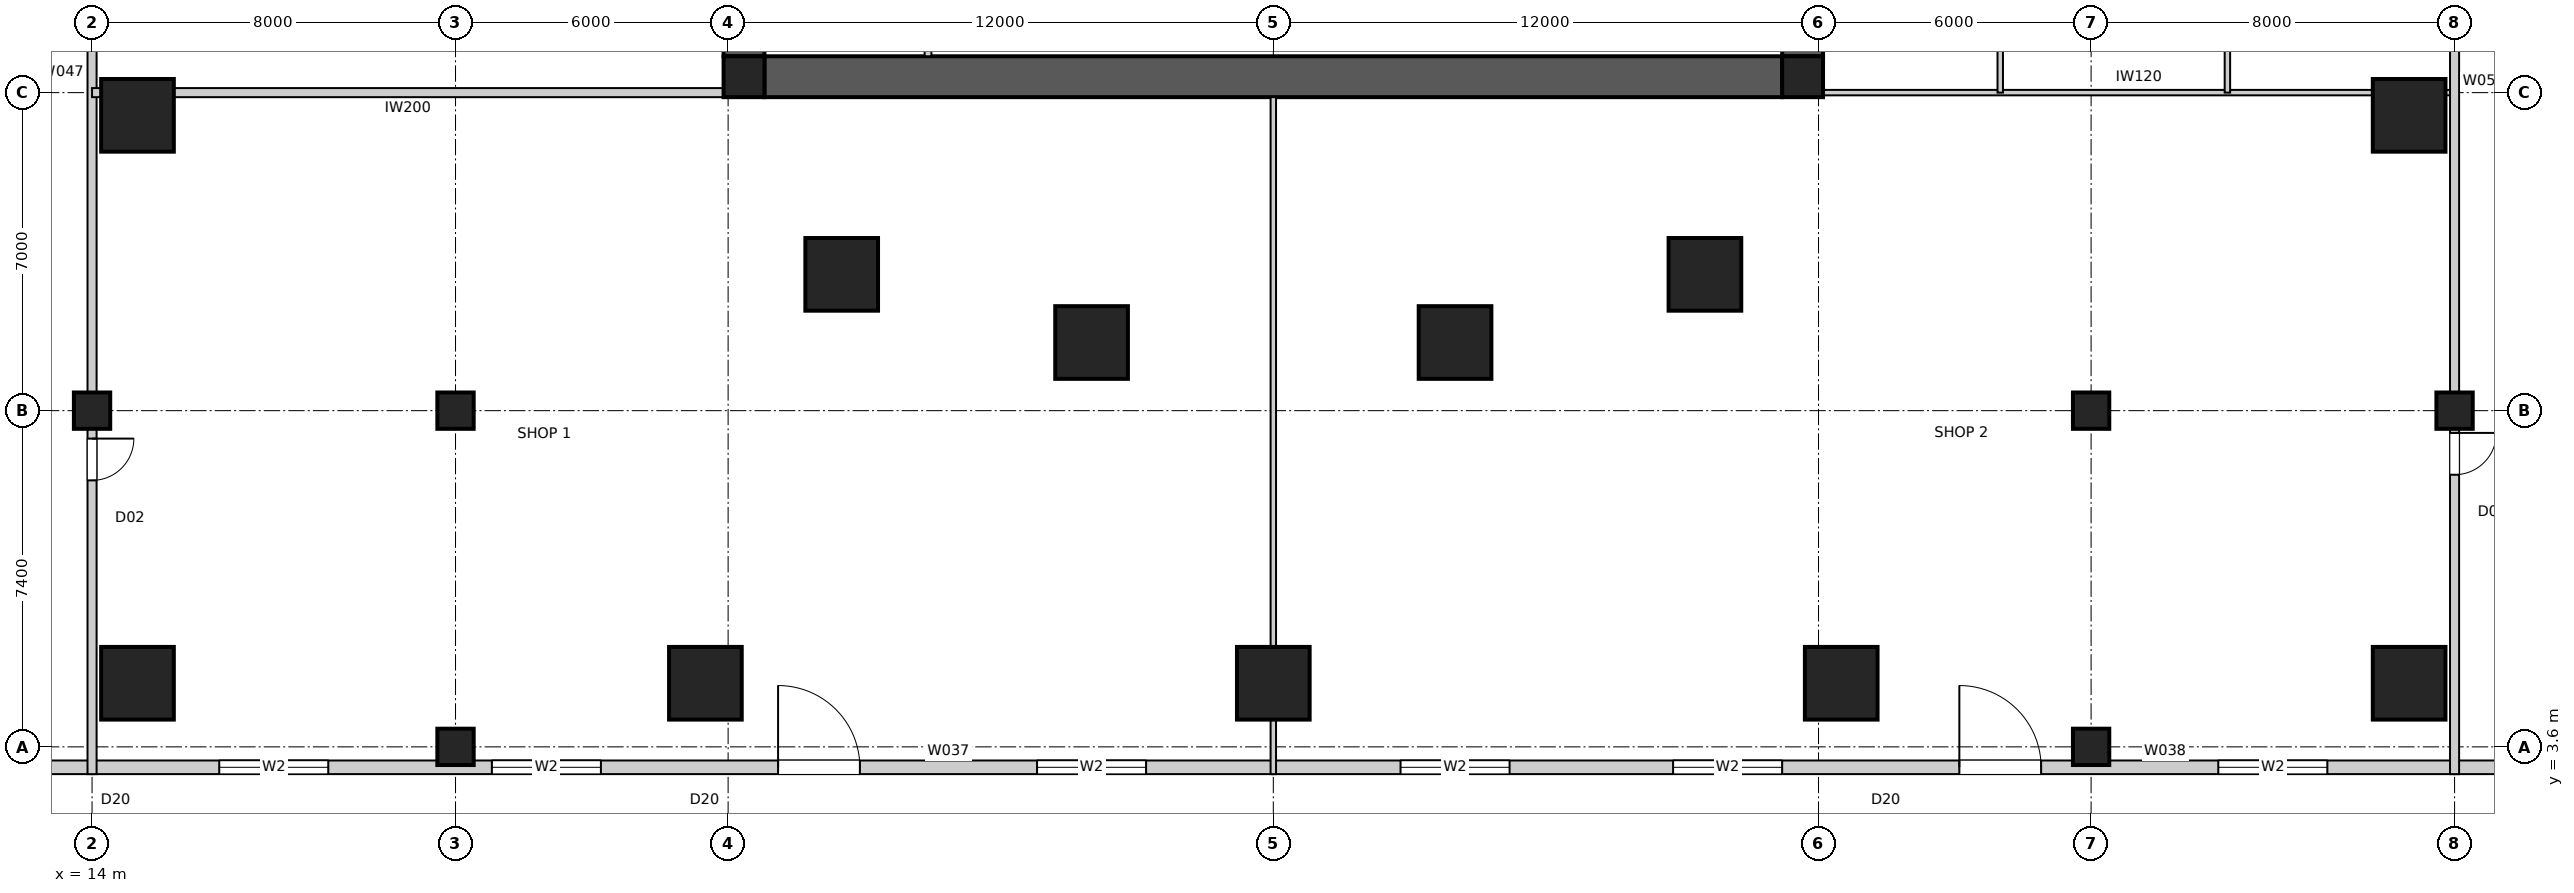
"""IFC4 building model, lengths in metres.
Left out: names, types, materials, properties, quantities, classifications, styles, units other than length and angle.
Written with IfcOpenShell. Run it as: python <this file> out.ifc"""

import sys

from ifc_helpers import new_model, si_unit, direction, frame, frame_2d, origin, origin_2d, place, context, subcontext, project, spatial, polyline, rectangle, outline, extrude, element, fill, save


model = new_model("IFC4")
c1 = context("Model", 3, precision=1e-05, world=origin(), true_north=direction((0.0, 1.0)))
c2 = subcontext(c1, "Body", "Model", "MODEL_VIEW")
j1 = project(units=[si_unit("LENGTHUNIT", "METRE"), si_unit("PLANEANGLEUNIT", "RADIAN")], contexts=[c1])
p1 = place(None, origin())
s1 = spatial("IfcSite", under=j1, at=p1, CompositionType="ELEMENT")
p2 = place(p1, origin())
s2 = spatial("IfcBuilding", under=s1, at=p2, CompositionType="ELEMENT")
p3 = place(p2, origin())
s3 = spatial("IfcBuildingStorey", under=s2, at=p3, CompositionType="ELEMENT", Elevation=0.0)
p4 = place(p3, frame((51.2, 18.35, 0.0), z_axis=(0.0, 0.0, 1.0), x_axis=(-1.0, 0.0, 0.0)))
e1 = element("IfcWall", 1, at=p4, inside=s3, PredefinedType="SHEAR", context=c2, shape_type="SweptSolid", body=[
    extrude(outline(polyline([(0.0, -0.45), (22.4, -0.45), (22.4, -0.025), (22.85, -0.025), (22.85, 0.025), (22.4, 0.025), (22.4, 0.45), (0.0, 0.45), (0.0, 0.025), (-0.45, 0.025), (-0.45, -0.025), (0.0, -0.025), (0.0, -0.45)])), origin(), (0.0, 0.0, 1.0), 6.0),
])
p5 = place(p3, frame((51.65, 18.8, 0.0), z_axis=(0.0, 0.0, 1.0), x_axis=(0.0, 1.0, 0.0)))
e2 = element("IfcWall", 2, at=p5, inside=s3, PredefinedType="SHEAR", context=c2, shape_type="SweptSolid", body=[
    extrude(outline(polyline([(0.0, -0.45), (22.4, -0.45), (22.4, -0.025), (22.85, -0.025), (22.85, 0.025), (22.4, 0.025), (22.4, 0.45), (0.0, 0.45), (0.0, 0.025), (-0.45, 0.025), (-0.45, -0.025), (0.0, -0.025), (0.0, -0.45)])), origin(), (0.0, 0.0, 1.0), 6.0),
])
p6 = place(p5, frame((11.14, 0.0, 0.0)))
e3 = element("IfcOpeningElement", 3, at=p6, cuts=e2, PredefinedType="OPENING", context=c2, shape_type="SweptSolid", body=[
    extrude(rectangle(XDim=1.02, YDim=2.4, at=frame_2d((0.51, 1.2))), frame((0.0, 0.46, 0.0), z_axis=(0.0, -1.0, 0.0), x_axis=(1.0, 0.0, 0.0)), (0.0, 0.0, 1.0), 0.92),
])
p7 = place(p3, frame((28.35, 41.2, 0.0), z_axis=(0.0, 0.0, 1.0), x_axis=(0.0, -1.0, 0.0)))
e4 = element("IfcWall", 4, at=p7, inside=s3, PredefinedType="SHEAR", context=c2, shape_type="SweptSolid", body=[
    extrude(outline(polyline([(0.0, -0.45), (22.4, -0.45), (22.4, -0.025), (22.85, -0.025), (22.85, 0.025), (22.4, 0.025), (22.4, 0.45), (0.0, 0.45), (0.0, 0.025), (-0.45, 0.025), (-0.45, -0.025), (0.0, -0.025), (0.0, -0.45)])), origin(), (0.0, 0.0, 1.0), 6.0),
])
p8 = place(p7, frame((11.14, 0.0, 0.0)))
e5 = element("IfcOpeningElement", 5, at=p8, cuts=e4, PredefinedType="OPENING", context=c2, shape_type="SweptSolid", body=[
    extrude(rectangle(XDim=1.02, YDim=2.4, at=frame_2d((0.51, 1.2))), frame((0.0, 0.46, 0.0), z_axis=(0.0, -1.0, 0.0), x_axis=(1.0, 0.0, 0.0)), (0.0, 0.0, 1.0), 0.92),
])
for number, where, z_axis, x_axis in (
    (6, (28.35, 18.35, 0.0), (0.0, 0.0, 1.0), (1.0, 0.0, 0.0)),
    (7, (51.65, 18.35, 0.0), (0.0, 0.0, 1.0), (1.0, 0.0, 0.0)),
):
    element("IfcColumn", number, at=place(p3, frame(where, z_axis=z_axis, x_axis=x_axis)), inside=s3, PredefinedType="COLUMN", context=c2, shape_type="SweptSolid", body=[
        extrude(rectangle(XDim=0.9, YDim=0.9, at=origin_2d()), origin(), (0.0, 0.0, 1.0), 6.0),
    ])
for number, where, z_axis, x_axis in (
    (8, (15.0, 5.0, 0.0), (0.0, 0.0, 1.0), (1.0, 0.0, 0.0)),
    (9, (27.5, 5.0, 0.0), (0.0, 0.0, 1.0), (1.0, 0.0, 0.0)),
    (10, (40.0, 5.0, 0.0), (0.0, 0.0, 1.0), (1.0, 0.0, 0.0)),
    (11, (52.5, 5.0, 0.0), (0.0, 0.0, 1.0), (1.0, 0.0, 0.0)),
    (12, (65.0, 5.0, 0.0), (0.0, 0.0, 1.0), (1.0, 0.0, 0.0)),
    (13, (65.0, 17.5, 0.0), (0.0, 0.0, 1.0), (1.0, 0.0, 0.0)),
    (14, (15.0, 17.5, 0.0), (0.0, 0.0, 1.0), (1.0, 0.0, 0.0)),
):
    element("IfcColumn", number, at=place(p3, frame(where, z_axis=z_axis, x_axis=x_axis)), inside=s3, PredefinedType="COLUMN", context=c2, shape_type="SweptSolid", body=[
        extrude(rectangle(XDim=1.6, YDim=1.6, at=origin_2d()), origin(), (0.0, 0.0, 1.0), 6.0),
    ])
for number, where, z_axis, x_axis in (
    (15, (14.0, 11.0, 0.0), (0.0, 0.0, 1.0), (1.0, 0.0, 0.0)),
    (16, (22.0, 3.6, 0.0), (0.0, 0.0, 1.0), (1.0, 0.0, 0.0)),
    (17, (22.0, 11.0, 0.0), (0.0, 0.0, 1.0), (1.0, 0.0, 0.0)),
    (18, (58.0, 3.6, 0.0), (0.0, 0.0, 1.0), (1.0, 0.0, 0.0)),
    (19, (58.0, 11.0, 0.0), (0.0, 0.0, 1.0), (1.0, 0.0, 0.0)),
    (20, (66.0, 11.0, 0.0), (0.0, 0.0, 1.0), (1.0, 0.0, 0.0)),
):
    element("IfcColumn", number, at=place(p3, frame(where, z_axis=z_axis, x_axis=x_axis)), inside=s3, PredefinedType="COLUMN", context=c2, shape_type="SweptSolid", body=[
        extrude(rectangle(XDim=0.8, YDim=0.8, at=origin_2d()), origin(), (0.0, 0.0, 1.0), 6.0),
    ])
for number, where, z_axis, x_axis in (
    (21, (30.5, 14.0, 0.0), (0.0, 0.0, 1.0), (1.0, 0.0, 0.0)),
    (22, (36.0, 12.5, 0.0), (0.0, 0.0, 1.0), (1.0, 0.0, 0.0)),
    (23, (44.0, 12.5, 0.0), (0.0, 0.0, 1.0), (1.0, 0.0, 0.0)),
    (24, (49.5, 14.0, 0.0), (0.0, 0.0, 1.0), (1.0, 0.0, 0.0)),
):
    element("IfcColumn", number, at=place(p3, frame(where, z_axis=z_axis, x_axis=x_axis)), inside=s3, PredefinedType="COLUMN", context=c2, shape_type="SweptSolid", body=[
        extrude(rectangle(XDim=1.6, YDim=1.6, at=origin_2d()), origin(), (0.0, 0.0, 1.0), 6.0),
    ])
p9 = place(p3, frame((2.0, 3.15, 0.0), z_axis=(0.0, 0.0, 1.0), x_axis=(1.0, 0.0, 0.0)))
e25 = element("IfcWall", 25, at=p9, inside=s3, PredefinedType="SOLIDWALL", context=c2, shape_type="SweptSolid", body=[
    extrude(rectangle(XDim=12.0, YDim=0.3, at=frame_2d((6.0, 0.0))), origin(), (0.0, 0.0, 1.0), 5.65),
])
p10 = place(p9, frame((1.1, 0.0, 0.0)))
e26 = element("IfcOpeningElement", 26, at=p10, cuts=e25, PredefinedType="OPENING", context=c2, shape_type="SweptSolid", body=[
    extrude(rectangle(XDim=1.8, YDim=2.7, at=frame_2d((0.9, 1.35))), frame((0.0, 0.16, 0.0), z_axis=(0.0, -1.0, 0.0), x_axis=(1.0, 0.0, 0.0)), (0.0, 0.0, 1.0), 0.32),
])
p11 = place(p9, frame((5.1, 0.0, 0.0)))
e27 = element("IfcOpeningElement", 27, at=p11, cuts=e25, PredefinedType="OPENING", context=c2, shape_type="SweptSolid", body=[
    extrude(rectangle(XDim=1.8, YDim=2.7, at=frame_2d((0.9, 1.35))), frame((0.0, 0.16, 0.0), z_axis=(0.0, -1.0, 0.0), x_axis=(1.0, 0.0, 0.0)), (0.0, 0.0, 1.0), 0.32),
])
p12 = place(p9, frame((9.1, 0.0, 0.0)))
e28 = element("IfcOpeningElement", 28, at=p12, cuts=e25, PredefinedType="OPENING", context=c2, shape_type="SweptSolid", body=[
    extrude(rectangle(XDim=1.8, YDim=2.7, at=frame_2d((0.9, 1.35))), frame((0.0, 0.16, 0.0), z_axis=(0.0, -1.0, 0.0), x_axis=(1.0, 0.0, 0.0)), (0.0, 0.0, 1.0), 0.32),
])
p13 = place(p3, frame((14.0, 3.15, 0.0), z_axis=(0.0, 0.0, 1.0), x_axis=(1.0, 0.0, 0.0)))
e29 = element("IfcWall", 29, at=p13, inside=s3, PredefinedType="SOLIDWALL", context=c2, shape_type="SweptSolid", body=[
    extrude(rectangle(XDim=26.0, YDim=0.3, at=frame_2d((13.0, 0.0))), origin(), (0.0, 0.0, 1.0), 5.65),
])
p14 = place(p13, frame((2.8, 0.0, 0.6)))
e30 = element("IfcOpeningElement", 30, at=p14, cuts=e29, PredefinedType="OPENING", context=c2, shape_type="SweptSolid", body=[
    extrude(rectangle(XDim=2.4, YDim=3.6, at=frame_2d((1.2, 1.8))), frame((0.0, 0.16, 0.0), z_axis=(0.0, -1.0, 0.0), x_axis=(1.0, 0.0, 0.0)), (0.0, 0.0, 1.0), 0.32),
])
p15 = place(p13, frame((8.8, 0.0, 0.6)))
e31 = element("IfcOpeningElement", 31, at=p15, cuts=e29, PredefinedType="OPENING", context=c2, shape_type="SweptSolid", body=[
    extrude(rectangle(XDim=2.4, YDim=3.6, at=frame_2d((1.2, 1.8))), frame((0.0, 0.16, 0.0), z_axis=(0.0, -1.0, 0.0), x_axis=(1.0, 0.0, 0.0)), (0.0, 0.0, 1.0), 0.32),
])
p16 = place(p13, frame((15.1, 0.0, 0.0)))
e32 = element("IfcOpeningElement", 32, at=p16, cuts=e29, PredefinedType="OPENING", context=c2, shape_type="SweptSolid", body=[
    extrude(rectangle(XDim=1.8, YDim=2.7, at=frame_2d((0.9, 1.35))), frame((0.0, 0.16, 0.0), z_axis=(0.0, -1.0, 0.0), x_axis=(1.0, 0.0, 0.0)), (0.0, 0.0, 1.0), 0.32),
])
p17 = place(p13, frame((20.8, 0.0, 0.6)))
e33 = element("IfcOpeningElement", 33, at=p17, cuts=e29, PredefinedType="OPENING", context=c2, shape_type="SweptSolid", body=[
    extrude(rectangle(XDim=2.4, YDim=3.6, at=frame_2d((1.2, 1.8))), frame((0.0, 0.16, 0.0), z_axis=(0.0, -1.0, 0.0), x_axis=(1.0, 0.0, 0.0)), (0.0, 0.0, 1.0), 0.32),
])
p18 = place(p3, frame((40.0, 3.15, 0.0), z_axis=(0.0, 0.0, 1.0), x_axis=(1.0, 0.0, 0.0)))
e34 = element("IfcWall", 34, at=p18, inside=s3, PredefinedType="SOLIDWALL", context=c2, shape_type="SweptSolid", body=[
    extrude(rectangle(XDim=26.0, YDim=0.3, at=frame_2d((13.0, 0.0))), origin(), (0.0, 0.0, 1.0), 5.65),
])
p19 = place(p18, frame((2.8, 0.0, 0.6)))
e35 = element("IfcOpeningElement", 35, at=p19, cuts=e34, PredefinedType="OPENING", context=c2, shape_type="SweptSolid", body=[
    extrude(rectangle(XDim=2.4, YDim=3.6, at=frame_2d((1.2, 1.8))), frame((0.0, 0.16, 0.0), z_axis=(0.0, -1.0, 0.0), x_axis=(1.0, 0.0, 0.0)), (0.0, 0.0, 1.0), 0.32),
])
p20 = place(p18, frame((8.8, 0.0, 0.6)))
e36 = element("IfcOpeningElement", 36, at=p20, cuts=e34, PredefinedType="OPENING", context=c2, shape_type="SweptSolid", body=[
    extrude(rectangle(XDim=2.4, YDim=3.6, at=frame_2d((1.2, 1.8))), frame((0.0, 0.16, 0.0), z_axis=(0.0, -1.0, 0.0), x_axis=(1.0, 0.0, 0.0)), (0.0, 0.0, 1.0), 0.32),
])
p21 = place(p18, frame((15.1, 0.0, 0.0)))
e37 = element("IfcOpeningElement", 37, at=p21, cuts=e34, PredefinedType="OPENING", context=c2, shape_type="SweptSolid", body=[
    extrude(rectangle(XDim=1.8, YDim=2.7, at=frame_2d((0.9, 1.35))), frame((0.0, 0.16, 0.0), z_axis=(0.0, -1.0, 0.0), x_axis=(1.0, 0.0, 0.0)), (0.0, 0.0, 1.0), 0.32),
])
p22 = place(p18, frame((20.8, 0.0, 0.6)))
e38 = element("IfcOpeningElement", 38, at=p22, cuts=e34, PredefinedType="OPENING", context=c2, shape_type="SweptSolid", body=[
    extrude(rectangle(XDim=2.4, YDim=3.6, at=frame_2d((1.2, 1.8))), frame((0.0, 0.16, 0.0), z_axis=(0.0, -1.0, 0.0), x_axis=(1.0, 0.0, 0.0)), (0.0, 0.0, 1.0), 0.32),
])
p23 = place(p3, frame((66.0, 3.15, 0.0), z_axis=(0.0, 0.0, 1.0), x_axis=(1.0, 0.0, 0.0)))
e39 = element("IfcWall", 39, at=p23, inside=s3, PredefinedType="SOLIDWALL", context=c2, shape_type="SweptSolid", body=[
    extrude(rectangle(XDim=12.0, YDim=0.3, at=frame_2d((6.0, 0.0))), origin(), (0.0, 0.0, 1.0), 5.65),
])
p24 = place(p23, frame((3.0, 0.0, 0.0)))
e40 = element("IfcOpeningElement", 40, at=p24, cuts=e39, PredefinedType="OPENING", context=c2, shape_type="SweptSolid", body=[
    extrude(rectangle(XDim=6.0, YDim=4.5, at=frame_2d((3.0, 2.25))), frame((0.0, 0.16, 0.0), z_axis=(0.0, -1.0, 0.0), x_axis=(1.0, 0.0, 0.0)), (0.0, 0.0, 1.0), 0.32),
])
p25 = place(p3, frame((32.4, 18.8, 0.0), z_axis=(0.0, 0.0, 1.0), x_axis=(0.0, 1.0, 0.0)))
e41 = element("IfcWall", 41, at=p25, inside=s3, PredefinedType="SOLIDWALL", context=c2, shape_type="SweptSolid", body=[
    extrude(rectangle(XDim=5.9, YDim=0.15, at=frame_2d((2.95, 0.0))), origin(), (0.0, 0.0, 1.0), 5.65),
])
p26 = place(p3, frame((14.0, 57.0, 0.0), z_axis=(0.0, 0.0, 1.0), x_axis=(0.0, -1.0, 0.0)))
e42 = element("IfcWall", 42, at=p26, inside=s3, PredefinedType="PARTITIONING", context=c2, shape_type="SweptSolid", body=[
    extrude(rectangle(XDim=54.0, YDim=0.2, at=frame_2d((27.0, 0.0))), origin(), (0.0, 0.0, 1.0), 5.65),
])
p27 = place(p26, frame((29.49, 0.0, 0.0)))
e43 = element("IfcOpeningElement", 43, at=p27, cuts=e42, PredefinedType="OPENING", context=c2, shape_type="SweptSolid", body=[
    extrude(rectangle(XDim=1.02, YDim=2.4, at=frame_2d((0.51, 1.2))), frame((0.0, 0.11, 0.0), z_axis=(0.0, -1.0, 0.0), x_axis=(1.0, 0.0, 0.0)), (0.0, 0.0, 1.0), 0.22),
])
p28 = place(p26, frame((46.615, 0.0, 0.0)))
e44 = element("IfcOpeningElement", 44, at=p28, cuts=e42, PredefinedType="OPENING", context=c2, shape_type="SweptSolid", body=[
    extrude(rectangle(XDim=0.92, YDim=2.34, at=frame_2d((0.46, 1.17))), frame((0.0, 0.11, 0.0), z_axis=(0.0, -1.0, 0.0), x_axis=(1.0, 0.0, 0.0)), (0.0, 0.0, 1.0), 0.22),
])
p29 = place(p26, frame((6.465, 0.0, 0.0)))
e45 = element("IfcOpeningElement", 45, at=p29, cuts=e42, PredefinedType="OPENING", context=c2, shape_type="SweptSolid", body=[
    extrude(rectangle(XDim=0.92, YDim=2.34, at=frame_2d((0.46, 1.17))), frame((0.0, 0.11, 0.0), z_axis=(0.0, -1.0, 0.0), x_axis=(1.0, 0.0, 0.0)), (0.0, 0.0, 1.0), 0.22),
])
p30 = place(p26, frame((17.49, 0.0, 0.0)))
e46 = element("IfcOpeningElement", 46, at=p30, cuts=e42, PredefinedType="OPENING", context=c2, shape_type="SweptSolid", body=[
    extrude(rectangle(XDim=1.02, YDim=2.1, at=frame_2d((0.51, 1.05))), frame((0.0, 0.11, 0.0), z_axis=(0.0, -1.0, 0.0), x_axis=(1.0, 0.0, 0.0)), (0.0, 0.0, 1.0), 0.22),
])
p31 = place(p3, frame((27.9, 18.0, 0.0), z_axis=(0.0, 0.0, 1.0), x_axis=(-1.0, 0.0, 0.0)))
e47 = element("IfcWall", 47, at=p31, inside=s3, PredefinedType="PARTITIONING", context=c2, shape_type="SweptSolid", body=[
    extrude(rectangle(XDim=13.9, YDim=0.2, at=frame_2d((6.95, 0.0))), origin(), (0.0, 0.0, 1.0), 5.65),
])
p32 = place(p3, frame((40.0, 17.9, 0.0), z_axis=(0.0, 0.0, 1.0), x_axis=(0.0, -1.0, 0.0)))
e48 = element("IfcWall", 48, at=p32, inside=s3, PredefinedType="PARTITIONING", context=c2, shape_type="SweptSolid", body=[
    extrude(rectangle(XDim=14.9, YDim=0.12, at=frame_2d((7.45, 0.0))), origin(), (0.0, 0.0, 1.0), 5.65),
])
p33 = place(p3, frame((52.1, 18.0, 0.0), z_axis=(0.0, 0.0, 1.0), x_axis=(1.0, 0.0, 0.0)))
e49 = element("IfcWall", 49, at=p33, inside=s3, PredefinedType="PARTITIONING", context=c2, shape_type="SweptSolid", body=[
    extrude(rectangle(XDim=13.9, YDim=0.12, at=frame_2d((6.95, 0.0))), origin(), (0.0, 0.0, 1.0), 5.65),
])
p34 = place(p3, frame((66.0, 26.0, 0.0), z_axis=(0.0, 0.0, 1.0), x_axis=(0.0, -1.0, 0.0)))
e50 = element("IfcWall", 50, at=p34, inside=s3, PredefinedType="PARTITIONING", context=c2, shape_type="SweptSolid", body=[
    extrude(rectangle(XDim=23.0, YDim=0.2, at=frame_2d((11.5, 0.0))), origin(), (0.0, 0.0, 1.0), 5.65),
])
p35 = place(p34, frame((15.49, 0.0, 0.0)))
e51 = element("IfcOpeningElement", 51, at=p35, cuts=e50, PredefinedType="OPENING", context=c2, shape_type="SweptSolid", body=[
    extrude(rectangle(XDim=0.92, YDim=2.34, at=frame_2d((0.46, 1.17))), frame((0.0, 0.11, 0.0), z_axis=(0.0, -1.0, 0.0), x_axis=(1.0, 0.0, 0.0)), (0.0, 0.0, 1.0), 0.22),
])
for number, where, z_axis, x_axis in (
    (52, (56.0, 26.0, 0.0), (0.0, 0.0, 1.0), (0.0, -1.0, 0.0)),
    (53, (61.0, 26.0, 0.0), (0.0, 0.0, 1.0), (0.0, -1.0, 0.0)),
):
    element("IfcWall", number, at=place(p3, frame(where, z_axis=z_axis, x_axis=x_axis)), inside=s3, PredefinedType="PARTITIONING", context=c2, shape_type="SweptSolid", body=[
        extrude(rectangle(XDim=8.0, YDim=0.12, at=frame_2d((4.0, 0.0))), origin(), (0.0, 0.0, 1.0), 5.65),
    ])
p36 = place(p14, origin())
e54 = element("IfcWindow", 54, at=p36, inside=s3, PartitioningType="SINGLE_PANEL", PredefinedType="WINDOW", context=c2, shape_type="SweptSolid", body=[
    extrude(rectangle(XDim=2.4, YDim=3.6, at=frame_2d((1.2, 1.8))), frame((0.0, 0.03, 0.0), z_axis=(0.0, -1.0, 0.0), x_axis=(1.0, 0.0, 0.0)), (0.0, 0.0, 1.0), 0.06),
])
fill(e30, e54)
p37 = place(p15, origin())
e55 = element("IfcWindow", 55, at=p37, inside=s3, PartitioningType="SINGLE_PANEL", PredefinedType="WINDOW", context=c2, shape_type="SweptSolid", body=[
    extrude(rectangle(XDim=2.4, YDim=3.6, at=frame_2d((1.2, 1.8))), frame((0.0, 0.03, 0.0), z_axis=(0.0, -1.0, 0.0), x_axis=(1.0, 0.0, 0.0)), (0.0, 0.0, 1.0), 0.06),
])
fill(e31, e55)
p38 = place(p16, origin())
e56 = element("IfcDoor", 56, at=p38, inside=s3, OperationType="DOUBLE_DOOR_DOUBLE_SWING", PredefinedType="DOOR", context=c2, shape_type="SweptSolid", body=[
    extrude(rectangle(XDim=1.8, YDim=2.7, at=frame_2d((0.9, 1.35))), frame((0.0, 0.025, 0.0), z_axis=(0.0, -1.0, 0.0), x_axis=(1.0, 0.0, 0.0)), (0.0, 0.0, 1.0), 0.05),
])
fill(e32, e56)
p39 = place(p17, origin())
e57 = element("IfcWindow", 57, at=p39, inside=s3, PartitioningType="SINGLE_PANEL", PredefinedType="WINDOW", context=c2, shape_type="SweptSolid", body=[
    extrude(rectangle(XDim=2.4, YDim=3.6, at=frame_2d((1.2, 1.8))), frame((0.0, 0.03, 0.0), z_axis=(0.0, -1.0, 0.0), x_axis=(1.0, 0.0, 0.0)), (0.0, 0.0, 1.0), 0.06),
])
fill(e33, e57)
p40 = place(p19, origin())
e58 = element("IfcWindow", 58, at=p40, inside=s3, PartitioningType="SINGLE_PANEL", PredefinedType="WINDOW", context=c2, shape_type="SweptSolid", body=[
    extrude(rectangle(XDim=2.4, YDim=3.6, at=frame_2d((1.2, 1.8))), frame((0.0, 0.03, 0.0), z_axis=(0.0, -1.0, 0.0), x_axis=(1.0, 0.0, 0.0)), (0.0, 0.0, 1.0), 0.06),
])
fill(e35, e58)
p41 = place(p20, origin())
e59 = element("IfcWindow", 59, at=p41, inside=s3, PartitioningType="SINGLE_PANEL", PredefinedType="WINDOW", context=c2, shape_type="SweptSolid", body=[
    extrude(rectangle(XDim=2.4, YDim=3.6, at=frame_2d((1.2, 1.8))), frame((0.0, 0.03, 0.0), z_axis=(0.0, -1.0, 0.0), x_axis=(1.0, 0.0, 0.0)), (0.0, 0.0, 1.0), 0.06),
])
fill(e36, e59)
p42 = place(p21, origin())
e60 = element("IfcDoor", 60, at=p42, inside=s3, OperationType="DOUBLE_DOOR_DOUBLE_SWING", PredefinedType="DOOR", context=c2, shape_type="SweptSolid", body=[
    extrude(rectangle(XDim=1.8, YDim=2.7, at=frame_2d((0.9, 1.35))), frame((0.0, 0.025, 0.0), z_axis=(0.0, -1.0, 0.0), x_axis=(1.0, 0.0, 0.0)), (0.0, 0.0, 1.0), 0.05),
])
fill(e37, e60)
p43 = place(p22, origin())
e61 = element("IfcWindow", 61, at=p43, inside=s3, PartitioningType="SINGLE_PANEL", PredefinedType="WINDOW", context=c2, shape_type="SweptSolid", body=[
    extrude(rectangle(XDim=2.4, YDim=3.6, at=frame_2d((1.2, 1.8))), frame((0.0, 0.03, 0.0), z_axis=(0.0, -1.0, 0.0), x_axis=(1.0, 0.0, 0.0)), (0.0, 0.0, 1.0), 0.06),
])
fill(e38, e61)
p44 = place(p28, origin())
e62 = element("IfcDoor", 62, at=p44, inside=s3, OperationType="SINGLE_SWING_LEFT", PredefinedType="DOOR", context=c2, shape_type="SweptSolid", body=[
    extrude(rectangle(XDim=0.92, YDim=2.34, at=frame_2d((0.46, 1.17))), frame((0.0, 0.025, 0.0), z_axis=(0.0, -1.0, 0.0), x_axis=(1.0, 0.0, 0.0)), (0.0, 0.0, 1.0), 0.05),
])
fill(e44, e62)
p45 = place(p35, origin())
e63 = element("IfcDoor", 63, at=p45, inside=s3, OperationType="SINGLE_SWING_LEFT", PredefinedType="DOOR", context=c2, shape_type="SweptSolid", body=[
    extrude(rectangle(XDim=0.92, YDim=2.34, at=frame_2d((0.46, 1.17))), frame((0.0, 0.025, 0.0), z_axis=(0.0, -1.0, 0.0), x_axis=(1.0, 0.0, 0.0)), (0.0, 0.0, 1.0), 0.05),
])
fill(e51, e63)
save(model, sys.argv[1])
